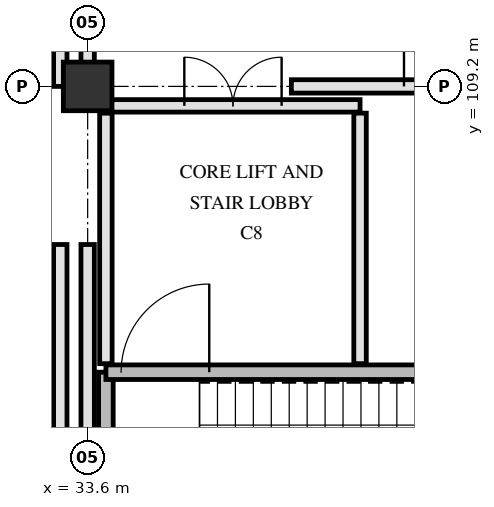
"""IFC4 building model, lengths in metres.
Left out: names, types, materials, properties, quantities, classifications, styles, units other than length and angle.
Written with IfcOpenShell. Run it as: python <this file> out.ifc"""

import sys

from ifc_helpers import new_model, si_unit, direction, frame, frame_2d, origin, origin_2d, place, context, subcontext, project, spatial, rectangle, extrude, element, fill, save


model = new_model("IFC4")
c1 = context("Model", 3, precision=1e-05, world=origin(), true_north=direction((0.0, 1.0)))
c2 = subcontext(c1, "Body", "Model", "MODEL_VIEW")
j1 = project(units=[si_unit("LENGTHUNIT", "METRE"), si_unit("PLANEANGLEUNIT", "RADIAN")], contexts=[c1])
p1 = place(None, origin())
s1 = spatial("IfcSite", under=j1, at=p1, CompositionType="ELEMENT")
p2 = place(p1, origin())
s2 = spatial("IfcBuilding", under=s1, at=p2, CompositionType="ELEMENT")
p3 = place(p2, frame((0.0, 0.0, -5.4)))
s3 = spatial("IfcBuildingStorey", under=s2, at=p3, CompositionType="ELEMENT", Elevation=-5.4)
p4 = place(p3, frame((33.6, 109.2, 0.0), z_axis=(0.0, 0.0, 1.0), x_axis=(1.0, 0.0, 0.0)))
e1 = element("IfcColumn", 1, at=p4, inside=s3, PredefinedType="COLUMN", context=c2, shape_type="SweptSolid", body=[
    extrude(rectangle(XDim=0.8, YDim=0.8, at=origin_2d()), origin(), (0.0, 0.0, 1.0), 5.4),
])
p5 = place(p3, frame((33.9, 101.18, 0.0), z_axis=(0.0, 0.0, 1.0), x_axis=(0.0, 1.0, 0.0)))
e2 = element("IfcWall", 2, at=p5, inside=s3, PredefinedType="SHEAR", context=c2, shape_type="SweptSolid", body=[
    extrude(rectangle(XDim=3.32, YDim=0.24, at=frame_2d((1.66, 0.0))), origin(), (0.0, 0.0, 1.0), 5.08),
])
p6 = place(p3, frame((33.9, 104.5, 0.0), z_axis=(0.0, 0.0, 1.0), x_axis=(1.0, 0.0, 0.0)))
e3 = element("IfcWall", 3, at=p6, inside=s3, PredefinedType="SHEAR", context=c2, shape_type="SweptSolid", body=[
    extrude(rectangle(XDim=7.82, YDim=0.24, at=frame_2d((3.91, 0.0))), origin(), (0.0, 0.0, 1.0), 5.08),
])
p7 = place(p6, frame((0.25, 0.0, 0.0)))
e4 = element("IfcOpeningElement", 4, at=p7, cuts=e3, PredefinedType="OPENING", context=c2, shape_type="SweptSolid", body=[
    extrude(rectangle(XDim=1.45, YDim=2.2, at=frame_2d((0.725, 1.1))), frame((0.0, 0.13, 0.0), z_axis=(0.0, -1.0, 0.0), x_axis=(1.0, 0.0, 0.0)), (0.0, 0.0, 1.0), 0.26),
])
p8 = place(p3, frame((38.08, 104.64, 0.0), z_axis=(0.0, 0.0, 1.0), x_axis=(0.0, 1.0, 0.0)))
e5 = element("IfcWall", 5, at=p8, inside=s3, PredefinedType="PARTITIONING", context=c2, shape_type="SweptSolid", body=[
    extrude(rectangle(XDim=4.12, YDim=0.205, at=frame_2d((2.06, 0.0))), origin(), (0.0, 0.0, 1.0), 5.07),
])
p9 = place(p3, frame((33.9, 104.64, 0.0), z_axis=(0.0, 0.0, 1.0), x_axis=(0.0, 1.0, 0.0)))
e6 = element("IfcWall", 6, at=p9, inside=s3, PredefinedType="PARTITIONING", context=c2, shape_type="SweptSolid", body=[
    extrude(rectangle(XDim=4.12, YDim=0.205, at=frame_2d((2.06, 0.0))), origin(), (0.0, 0.0, 1.0), 4.47),
])
p10 = place(p3, frame((33.9, 108.88, 0.0), z_axis=(0.0, 0.0, 1.0), x_axis=(1.0, 0.0, 0.0)))
e7 = element("IfcWall", 7, at=p10, inside=s3, PredefinedType="PARTITIONING", context=c2, shape_type="SweptSolid", body=[
    extrude(rectangle(XDim=4.18, YDim=0.205, at=frame_2d((2.09, 0.0))), origin(), (0.0, 0.0, 1.0), 4.42),
])
p11 = place(p10, frame((1.29, 0.0, 0.0)))
e8 = element("IfcOpeningElement", 8, at=p11, cuts=e7, PredefinedType="OPENING", context=c2, shape_type="SweptSolid", body=[
    extrude(rectangle(XDim=1.6, YDim=2.25, at=frame_2d((0.8, 1.125))), frame((0.0, 0.113, 0.0), z_axis=(0.0, -1.0, 0.0), x_axis=(1.0, 0.0, 0.0)), (0.0, 0.0, 1.0), 0.225),
])
p12 = place(p3, frame((36.95, 109.2, 0.0), z_axis=(0.0, 0.0, 1.0), x_axis=(1.0, 0.0, 0.0)))
e9 = element("IfcWall", 9, at=p12, inside=s3, PredefinedType="PARTITIONING", context=c2, shape_type="SweptSolid", body=[
    extrude(rectangle(XDim=4.655, YDim=0.22, at=frame_2d((2.328, 0.0))), origin(), (0.0, 0.0, 1.0), 4.42),
])
p13 = place(p12, frame((1.853, 0.0, 0.0)))
e10 = element("IfcOpeningElement", 10, at=p13, cuts=e9, PredefinedType="OPENING", context=c2, shape_type="SweptSolid", body=[
    extrude(rectangle(XDim=0.95, YDim=2.1, at=frame_2d((0.475, 1.05))), frame((0.0, 0.12, 0.0), z_axis=(0.0, -1.0, 0.0), x_axis=(1.0, 0.0, 0.0)), (0.0, 0.0, 1.0), 0.24),
])
p14 = place(p3, frame((33.15, 101.465, 0.0), z_axis=(0.0, 0.0, 1.0), x_axis=(0.0, 1.0, 0.0)))
e11 = element("IfcWall", 11, at=p14, inside=s3, PredefinedType="PARTITIONING", context=c2, shape_type="SweptSolid", body=[
    extrude(rectangle(XDim=5.135, YDim=0.22, at=frame_2d((2.567, 0.0))), origin(), (0.0, 0.0, 1.0), 5.07),
])
p15 = place(p3, frame((33.15, 109.2, 0.0), z_axis=(0.0, 0.0, 1.0), x_axis=(0.0, 1.0, 0.0)))
e12 = element("IfcWall", 12, at=p15, inside=s3, PredefinedType="PARTITIONING", context=c2, shape_type="SweptSolid", body=[
    extrude(rectangle(XDim=2.335, YDim=0.22, at=frame_2d((1.167, 0.0))), origin(), (0.0, 0.0, 1.0), 4.42),
])
p16 = place(p3, frame((33.6, 101.195, 0.0), z_axis=(0.0, 0.0, 1.0), x_axis=(0.0, 1.0, 0.0)))
e13 = element("IfcWall", 13, at=p16, inside=s3, PredefinedType="PARTITIONING", context=c2, shape_type="SweptSolid", body=[
    extrude(rectangle(XDim=5.405, YDim=0.22, at=frame_2d((2.703, 0.0))), origin(), (0.0, 0.0, 1.0), 4.47),
])
p17 = place(p3, frame((33.6, 109.595, 0.0), z_axis=(0.0, 0.0, 1.0), x_axis=(0.0, 1.0, 0.0)))
e14 = element("IfcWall", 14, at=p17, inside=s3, PredefinedType="PARTITIONING", context=c2, shape_type="SweptSolid", body=[
    extrude(rectangle(XDim=7.61, YDim=0.22, at=frame_2d((3.805, 0.0))), origin(), (0.0, 0.0, 1.0), 4.47),
])
p18 = place(p7, origin())
e15 = element("IfcDoor", 15, at=p18, inside=s3, OperationType="SINGLE_SWING_RIGHT", PredefinedType="DOOR", context=c2, shape_type="SweptSolid", body=[
    extrude(rectangle(XDim=1.45, YDim=2.2, at=frame_2d((0.725, 1.1))), frame((0.0, 0.025, 0.0), z_axis=(0.0, -1.0, 0.0), x_axis=(1.0, 0.0, 0.0)), (0.0, 0.0, 1.0), 0.05),
])
fill(e4, e15)
p19 = place(p11, origin())
e16 = element("IfcDoor", 16, at=p19, inside=s3, OperationType="DOUBLE_SWING_LEFT", PredefinedType="DOOR", context=c2, shape_type="SweptSolid", body=[
    extrude(rectangle(XDim=1.6, YDim=2.25, at=frame_2d((0.8, 1.125))), frame((0.0, 0.025, 0.0), z_axis=(0.0, -1.0, 0.0), x_axis=(1.0, 0.0, 0.0)), (0.0, 0.0, 1.0), 0.05),
])
fill(e8, e16)
p20 = place(p13, origin())
e17 = element("IfcDoor", 17, at=p20, inside=s3, OperationType="SINGLE_SWING_LEFT", PredefinedType="DOOR", context=c2, shape_type="SweptSolid", body=[
    extrude(rectangle(XDim=0.95, YDim=2.1, at=frame_2d((0.475, 1.05))), frame((0.0, 0.025, 0.0), z_axis=(0.0, -1.0, 0.0), x_axis=(1.0, 0.0, 0.0)), (0.0, 0.0, 1.0), 0.05),
])
fill(e10, e17)
save(model, sys.argv[1])
